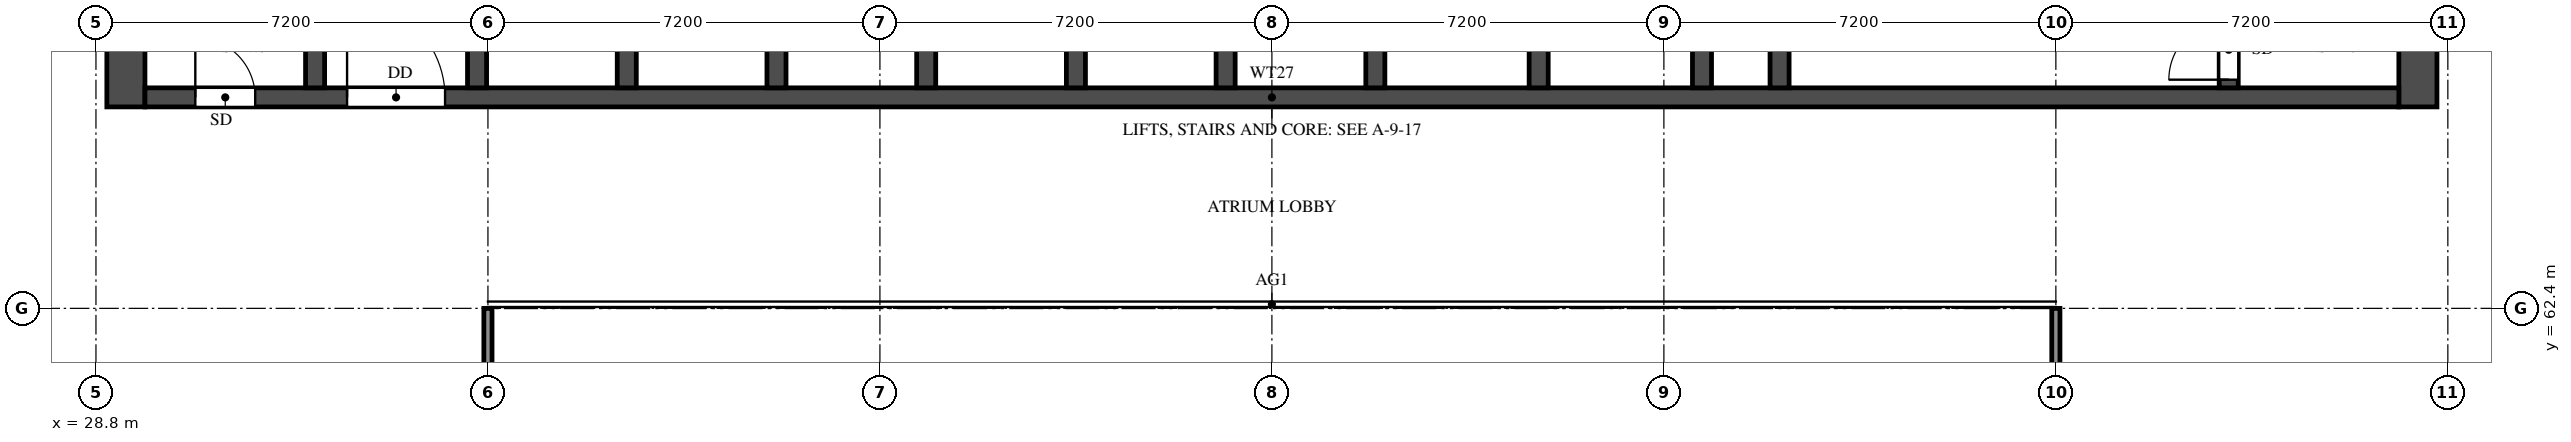
"""IFC4 building model, lengths in metres.
Left out: names, types, materials, properties, quantities, classifications, styles, units other than length and angle.
Written with IfcOpenShell. Run it as: python <this file> out.ifc"""

import sys

from ifc_helpers import new_model, si_unit, direction, frame, frame_2d, origin, place, context, subcontext, project, spatial, rectangle, extrude, element, fill, save


model = new_model("IFC4")
c1 = context("Model", 3, precision=1e-05, world=origin(), true_north=direction((0.0, 1.0)))
c2 = subcontext(c1, "Body", "Model", "MODEL_VIEW")
j1 = project(units=[si_unit("LENGTHUNIT", "METRE"), si_unit("PLANEANGLEUNIT", "RADIAN")], contexts=[c1])
p1 = place(None, origin())
s1 = spatial("IfcSite", under=j1, at=p1, CompositionType="ELEMENT")
p2 = place(p1, origin())
s2 = spatial("IfcBuilding", under=s1, at=p2, CompositionType="ELEMENT")
p3 = place(p2, frame((0.0, 0.0, 113.0)))
s3 = spatial("IfcBuildingStorey", under=s2, at=p3, CompositionType="ELEMENT", Elevation=113.0)
for number, where, z_axis, x_axis in (
    (1, (29.35, 66.1, 0.0), (0.0, 0.0, 1.0), (0.0, 1.0, 0.0)),
    (2, (71.45, 66.1, 0.0), (0.0, 0.0, 1.0), (0.0, 1.0, 0.0)),
):
    element("IfcWall", number, at=place(p3, frame(where, z_axis=z_axis, x_axis=x_axis)), inside=s3, PredefinedType="SHEAR", context=c2, shape_type="SweptSolid", body=[
        extrude(rectangle(XDim=11.9, YDim=0.7, at=frame_2d((5.95, 0.0))), origin(), (0.0, 0.0, 1.0), 3.2),
    ])
p4 = place(p3, frame((29.7, 66.275, 0.0), z_axis=(0.0, 0.0, 1.0), x_axis=(1.0, 0.0, 0.0)))
e3 = element("IfcWall", 3, at=p4, inside=s3, PredefinedType="SHEAR", context=c2, shape_type="SweptSolid", body=[
    extrude(rectangle(XDim=41.4, YDim=0.35, at=frame_2d((20.7, 0.0))), origin(), (0.0, 0.0, 1.0), 3.2),
])
p5 = place(p4, frame((0.925, 0.0, 0.0)))
e4 = element("IfcOpeningElement", 4, at=p5, cuts=e3, PredefinedType="OPENING", context=c2, shape_type="SweptSolid", body=[
    extrude(rectangle(XDim=1.1, YDim=2.1, at=frame_2d((0.55, 1.05))), frame((0.0, 0.185, 0.0), z_axis=(0.0, -1.0, 0.0), x_axis=(1.0, 0.0, 0.0)), (0.0, 0.0, 1.0), 0.37),
])
p6 = place(p4, frame((3.712, 0.0, 0.0)))
e5 = element("IfcOpeningElement", 5, at=p6, cuts=e3, PredefinedType="OPENING", context=c2, shape_type="SweptSolid", body=[
    extrude(rectangle(XDim=1.8, YDim=2.1, at=frame_2d((0.9, 1.05))), frame((0.0, 0.185, 0.0), z_axis=(0.0, -1.0, 0.0), x_axis=(1.0, 0.0, 0.0)), (0.0, 0.0, 1.0), 0.37),
])
p7 = place(p3, frame((32.825, 66.45, 0.0), z_axis=(0.0, 0.0, 1.0), x_axis=(0.0, 1.0, 0.0)))
e6 = element("IfcWall", 6, at=p7, inside=s3, PredefinedType="SHEAR", context=c2, shape_type="SweptSolid", body=[
    extrude(rectangle(XDim=10.85, YDim=0.35, at=frame_2d((5.425, 0.0))), origin(), (0.0, 0.0, 1.0), 3.2),
])
p8 = place(p3, frame((67.975, 66.45, 0.0), z_axis=(0.0, 0.0, 1.0), x_axis=(0.0, 1.0, 0.0)))
e7 = element("IfcWall", 7, at=p8, inside=s3, PredefinedType="SHEAR", context=c2, shape_type="SweptSolid", body=[
    extrude(rectangle(XDim=10.85, YDim=0.35, at=frame_2d((5.425, 0.0))), origin(), (0.0, 0.0, 1.0), 3.2),
])
p9 = place(p8, frame((0.15, 0.0, 0.0)))
e8 = element("IfcOpeningElement", 8, at=p9, cuts=e7, PredefinedType="OPENING", context=c2, shape_type="SweptSolid", body=[
    extrude(rectangle(XDim=1.1, YDim=2.1, at=frame_2d((0.55, 1.05))), frame((0.0, 0.185, 0.0), z_axis=(0.0, -1.0, 0.0), x_axis=(1.0, 0.0, 0.0)), (0.0, 0.0, 1.0), 0.37),
])
p10 = place(p3, frame((59.725, 66.45, 0.0), z_axis=(0.0, 0.0, 1.0), x_axis=(0.0, 1.0, 0.0)))
e9 = element("IfcWall", 9, at=p10, inside=s3, PredefinedType="SHEAR", context=c2, shape_type="SweptSolid", body=[
    extrude(rectangle(XDim=6.125, YDim=0.35, at=frame_2d((3.062, 0.0))), origin(), (0.0, 0.0, 1.0), 3.2),
])
p11 = place(p10, frame((3.85, 0.0, 0.0)))
e10 = element("IfcOpeningElement", 10, at=p11, cuts=e9, PredefinedType="OPENING", context=c2, shape_type="SweptSolid", body=[
    extrude(rectangle(XDim=1.2, YDim=2.1, at=frame_2d((0.6, 1.05))), frame((0.0, 0.185, 0.0), z_axis=(0.0, -1.0, 0.0), x_axis=(1.0, 0.0, 0.0)), (0.0, 0.0, 1.0), 0.37),
])
for number, where, z_axis, x_axis in (
    (11, (35.8, 66.45, 0.0), (0.0, 0.0, 1.0), (0.0, 1.0, 0.0)),
    (12, (38.55, 66.45, 0.0), (0.0, 0.0, 1.0), (0.0, 1.0, 0.0)),
    (13, (41.3, 66.45, 0.0), (0.0, 0.0, 1.0), (0.0, 1.0, 0.0)),
    (14, (44.05, 66.45, 0.0), (0.0, 0.0, 1.0), (0.0, 1.0, 0.0)),
    (15, (46.8, 66.45, 0.0), (0.0, 0.0, 1.0), (0.0, 1.0, 0.0)),
    (16, (49.55, 66.45, 0.0), (0.0, 0.0, 1.0), (0.0, 1.0, 0.0)),
    (17, (52.3, 66.45, 0.0), (0.0, 0.0, 1.0), (0.0, 1.0, 0.0)),
    (18, (55.3, 66.45, 0.0), (0.0, 0.0, 1.0), (0.0, 1.0, 0.0)),
    (19, (58.3, 66.45, 0.0), (0.0, 0.0, 1.0), (0.0, 1.0, 0.0)),
):
    element("IfcWall", number, at=place(p3, frame(where, z_axis=z_axis, x_axis=x_axis)), inside=s3, PredefinedType="SHEAR", context=c2, shape_type="SweptSolid", body=[
        extrude(rectangle(XDim=2.425, YDim=0.35, at=frame_2d((1.212, 0.0))), origin(), (0.0, 0.0, 1.0), 3.2),
    ])
for number, where, z_axis, x_axis in (
    (20, (36.0, 48.0, 0.0), (0.0, 0.0, 1.0), (0.0, 1.0, 0.0)),
    (21, (64.8, 48.0, 0.0), (0.0, 0.0, 1.0), (0.0, 1.0, 0.0)),
):
    element("IfcWall", number, at=place(p3, frame(where, z_axis=z_axis, x_axis=x_axis)), inside=s3, PredefinedType="SOLIDWALL", context=c2, shape_type="SweptSolid", body=[
        extrude(rectangle(XDim=14.4, YDim=0.15, at=frame_2d((7.2, 0.0))), origin(), (0.0, 0.0, 1.0), 2.3),
    ])
p12 = place(p5, origin())
e22 = element("IfcDoor", 22, at=p12, inside=s3, OperationType="SINGLE_SWING_LEFT", PredefinedType="DOOR", context=c2, shape_type="SweptSolid", body=[
    extrude(rectangle(XDim=1.1, YDim=2.1, at=frame_2d((0.55, 1.05))), frame((0.0, 0.025, 0.0), z_axis=(0.0, -1.0, 0.0), x_axis=(1.0, 0.0, 0.0)), (0.0, 0.0, 1.0), 0.05),
])
fill(e4, e22)
p13 = place(p9, origin())
e23 = element("IfcDoor", 23, at=p13, inside=s3, OperationType="SINGLE_SWING_LEFT", PredefinedType="DOOR", context=c2, shape_type="SweptSolid", body=[
    extrude(rectangle(XDim=1.1, YDim=2.1, at=frame_2d((0.55, 1.05))), frame((0.0, 0.025, 0.0), z_axis=(0.0, -1.0, 0.0), x_axis=(1.0, 0.0, 0.0)), (0.0, 0.0, 1.0), 0.05),
])
fill(e8, e23)
p14 = place(p6, origin())
e24 = element("IfcDoor", 24, at=p14, inside=s3, OperationType="DOUBLE_DOOR_SINGLE_SWING", PredefinedType="DOOR", context=c2, shape_type="SweptSolid", body=[
    extrude(rectangle(XDim=1.8, YDim=2.1, at=frame_2d((0.9, 1.05))), frame((0.0, 0.025, 0.0), z_axis=(0.0, -1.0, 0.0), x_axis=(1.0, 0.0, 0.0)), (0.0, 0.0, 1.0), 0.05),
])
fill(e5, e24)
save(model, sys.argv[1])
